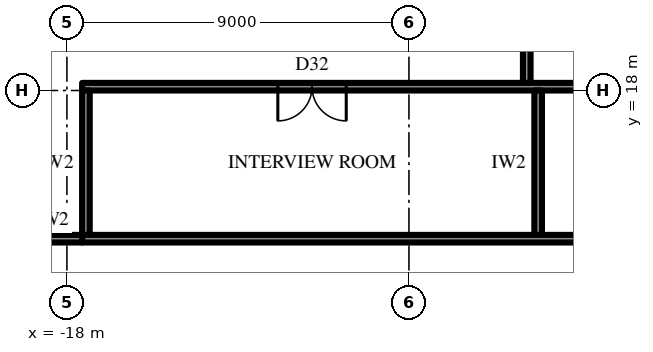
"""IFC4 building model, lengths in metres.
Left out: names, types, materials, properties, quantities, classifications, styles, units other than length and angle.
Written with IfcOpenShell. Run it as: python <this file> out.ifc"""

import sys

from ifc_helpers import new_model, si_unit, direction, frame, frame_2d, origin, place, context, subcontext, project, spatial, rectangle, extrude, element, fill, save


model = new_model("IFC4")
c1 = context("Model", 3, precision=1e-05, world=origin(), true_north=direction((0.0, 1.0)))
c2 = subcontext(c1, "Body", "Model", "MODEL_VIEW")
j1 = project(units=[si_unit("LENGTHUNIT", "METRE"), si_unit("PLANEANGLEUNIT", "RADIAN")], contexts=[c1])
p1 = place(None, origin())
s1 = spatial("IfcSite", under=j1, at=p1, CompositionType="ELEMENT")
p2 = place(p1, origin())
s2 = spatial("IfcBuilding", under=s1, at=p2, CompositionType="ELEMENT")
p3 = place(p2, frame((0.0, 0.0, 78.1)))
s3 = spatial("IfcBuildingStorey", under=s2, at=p3, CompositionType="ELEMENT", Elevation=78.1)
p4 = place(p3, frame((-17.6, 14.1, 0.0), z_axis=(0.0, 0.0, 1.0), x_axis=(1.0, 0.0, 0.0)))
e1 = element("IfcWall", 1, at=p4, inside=s3, PredefinedType="PARTITIONING", context=c2, shape_type="SweptSolid", body=[
    extrude(rectangle(XDim=35.2, YDim=0.2, at=frame_2d((17.6, 0.0))), origin(), (0.0, 0.0, 1.0), 4.0),
])
p5 = place(p3, frame((-17.6, 18.1, 0.0), z_axis=(0.0, 0.0, 1.0), x_axis=(1.0, 0.0, 0.0)))
e2 = element("IfcWall", 2, at=p5, inside=s3, PredefinedType="PARTITIONING", context=c2, shape_type="SweptSolid", body=[
    extrude(rectangle(XDim=35.2, YDim=0.2, at=frame_2d((17.6, 0.0))), origin(), (0.0, 0.0, 1.0), 4.0),
])
p6 = place(p5, frame((5.15, 0.0, 0.0)))
e3 = element("IfcOpeningElement", 3, at=p6, cuts=e2, PredefinedType="OPENING", context=c2, shape_type="SweptSolid", body=[
    extrude(rectangle(XDim=1.8, YDim=2.4, at=frame_2d((0.9, 1.2))), frame((0.0, 0.11, 0.0), z_axis=(0.0, -1.0, 0.0), x_axis=(1.0, 0.0, 0.0)), (0.0, 0.0, 1.0), 0.22),
])
p7 = place(p5, frame((16.875, 0.0, 0.0)))
e4 = element("IfcOpeningElement", 4, at=p7, cuts=e2, PredefinedType="OPENING", context=c2, shape_type="SweptSolid", body=[
    extrude(rectangle(XDim=1.8, YDim=2.4, at=frame_2d((0.9, 1.2))), frame((0.0, 0.11, 0.0), z_axis=(0.0, -1.0, 0.0), x_axis=(1.0, 0.0, 0.0)), (0.0, 0.0, 1.0), 0.22),
])
p8 = place(p5, frame((28.425, 0.0, 0.0)))
e5 = element("IfcOpeningElement", 5, at=p8, cuts=e2, PredefinedType="OPENING", context=c2, shape_type="SweptSolid", body=[
    extrude(rectangle(XDim=1.8, YDim=2.4, at=frame_2d((0.9, 1.2))), frame((0.0, 0.11, 0.0), z_axis=(0.0, -1.0, 0.0), x_axis=(1.0, 0.0, 0.0)), (0.0, 0.0, 1.0), 0.22),
])
for number, where, z_axis, x_axis in (
    (6, (-17.5, 14.2, 0.0), (0.0, 0.0, 1.0), (0.0, 1.0, 0.0)),
    (7, (-5.6, 14.2, 0.0), (0.0, 0.0, 1.0), (0.0, 1.0, 0.0)),
):
    element("IfcWall", number, at=place(p3, frame(where, z_axis=z_axis, x_axis=x_axis)), inside=s3, PredefinedType="PARTITIONING", context=c2, shape_type="SweptSolid", body=[
        extrude(rectangle(XDim=3.8, YDim=0.2, at=frame_2d((1.9, 0.0))), origin(), (0.0, 0.0, 1.0), 4.0),
    ])
p9 = place(p3, frame((-19.2, 14.1, 0.0), z_axis=(0.0, 0.0, 1.0), x_axis=(1.0, 0.0, 0.0)))
e8 = element("IfcWall", 8, at=p9, inside=s3, PredefinedType="PARTITIONING", context=c2, shape_type="SweptSolid", body=[
    extrude(rectangle(XDim=1.6, YDim=0.2, at=frame_2d((0.8, 0.0))), origin(), (0.0, 0.0, 1.0), 4.0),
])
p10 = place(p3, frame((-5.9, 18.2, 0.0), z_axis=(0.0, 0.0, 1.0), x_axis=(0.0, 1.0, 0.0)))
e9 = element("IfcWall", 9, at=p10, inside=s3, PredefinedType="PARTITIONING", context=c2, shape_type="SweptSolid", body=[
    extrude(rectangle(XDim=14.1, YDim=0.2, at=frame_2d((7.05, 0.0))), origin(), (0.0, 0.0, 1.0), 4.0),
])
p11 = place(p10, frame((0.91, 0.0, 0.0)))
e10 = element("IfcOpeningElement", 10, at=p11, cuts=e9, PredefinedType="OPENING", context=c2, shape_type="SweptSolid", body=[
    extrude(rectangle(XDim=1.0, YDim=2.2, at=frame_2d((0.5, 1.1))), frame((0.0, 0.11, 0.0), z_axis=(0.0, -1.0, 0.0), x_axis=(1.0, 0.0, 0.0)), (0.0, 0.0, 1.0), 0.22),
])
p12 = place(p6, frame((1.8, 0.0, 0.0), z_axis=(0.0, 0.0, 1.0), x_axis=(-1.0, 0.0, 0.0)))
e11 = element("IfcDoor", 11, at=p12, inside=s3, OperationType="DOUBLE_DOOR_SINGLE_SWING", PredefinedType="DOOR", context=c2, shape_type="SweptSolid", body=[
    extrude(rectangle(XDim=1.8, YDim=2.4, at=frame_2d((0.9, 1.2))), frame((0.0, 0.025, 0.0), z_axis=(0.0, -1.0, 0.0), x_axis=(1.0, 0.0, 0.0)), (0.0, 0.0, 1.0), 0.05),
])
fill(e3, e11)
save(model, sys.argv[1])
